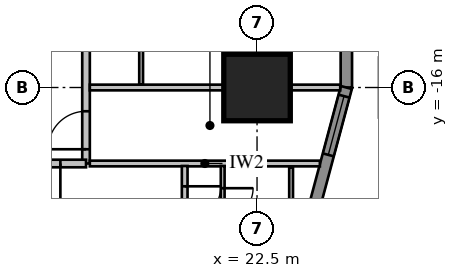
"""IFC4 building model, lengths in metres.
Left out: names, types, materials, properties, quantities, classifications, styles, units other than length and angle.
Written with IfcOpenShell. Run it as: python <this file> out.ifc"""

import sys

from ifc_helpers import new_model, si_unit, direction, frame, frame_2d, origin, origin_2d, place, context, subcontext, project, spatial, rectangle, extrude, element, fill, save


model = new_model("IFC4")
c1 = context("Model", 3, precision=1e-05, world=origin(), true_north=direction((0.0, 1.0)))
c2 = subcontext(c1, "Body", "Model", "MODEL_VIEW")
j1 = project(units=[si_unit("LENGTHUNIT", "METRE"), si_unit("PLANEANGLEUNIT", "RADIAN")], contexts=[c1])
p1 = place(None, origin())
s1 = spatial("IfcSite", under=j1, at=p1, CompositionType="ELEMENT")
p2 = place(p1, origin())
s2 = spatial("IfcBuilding", under=s1, at=p2, CompositionType="ELEMENT")
p3 = place(p2, frame((0.0, 0.0, 27.55)))
s3 = spatial("IfcBuildingStorey", under=s2, at=p3, CompositionType="ELEMENT", Elevation=27.55)
p4 = place(p3, frame((22.5, -16.0, 0.0), z_axis=(0.0, 0.0, 1.0), x_axis=(1.0, 0.0, 0.0)))
e1 = element("IfcColumn", 1, at=p4, inside=s3, PredefinedType="COLUMN", context=c2, shape_type="SweptSolid", body=[
    extrude(rectangle(XDim=1.75, YDim=1.75, at=origin_2d()), origin(), (0.0, 0.0, 1.0), 3.85),
])
p5 = place(p3, frame((24.85, -16.0, 0.0), z_axis=(0.0, 0.0, 1.0), x_axis=(0.0, 1.0, 0.0)))
e2 = element("IfcWall", 2, at=p5, inside=s3, PredefinedType="SOLIDWALL", context=c2, shape_type="SweptSolid", body=[
    extrude(rectangle(XDim=32.0, YDim=0.3, at=frame_2d((16.0, 0.0))), origin(), (0.0, 0.0, 1.0), 3.65),
])
p6 = place(p5, frame((1.2, 0.0, 0.75)))
e3 = element("IfcOpeningElement", 3, at=p6, cuts=e2, PredefinedType="OPENING", context=c2, shape_type="SweptSolid", body=[
    extrude(rectangle(XDim=1.6, YDim=1.8, at=frame_2d((0.8, 0.9))), frame((0.0, 0.17, 0.0), z_axis=(0.0, -1.0, 0.0), x_axis=(1.0, 0.0, 0.0)), (0.0, 0.0, 1.0), 0.34),
])
p7 = place(p5, frame((5.2, 0.0, 0.75)))
e4 = element("IfcOpeningElement", 4, at=p7, cuts=e2, PredefinedType="OPENING", context=c2, shape_type="SweptSolid", body=[
    extrude(rectangle(XDim=1.6, YDim=1.8, at=frame_2d((0.8, 0.9))), frame((0.0, 0.17, 0.0), z_axis=(0.0, -1.0, 0.0), x_axis=(1.0, 0.0, 0.0)), (0.0, 0.0, 1.0), 0.34),
])
p8 = place(p5, frame((17.2, 0.0, 0.75)))
e5 = element("IfcOpeningElement", 5, at=p8, cuts=e2, PredefinedType="OPENING", context=c2, shape_type="SweptSolid", body=[
    extrude(rectangle(XDim=1.6, YDim=1.8, at=frame_2d((0.8, 0.9))), frame((0.0, 0.17, 0.0), z_axis=(0.0, -1.0, 0.0), x_axis=(1.0, 0.0, 0.0)), (0.0, 0.0, 1.0), 0.34),
])
p9 = place(p5, frame((21.2, 0.0, 0.75)))
e6 = element("IfcOpeningElement", 6, at=p9, cuts=e2, PredefinedType="OPENING", context=c2, shape_type="SweptSolid", body=[
    extrude(rectangle(XDim=1.6, YDim=1.8, at=frame_2d((0.8, 0.9))), frame((0.0, 0.17, 0.0), z_axis=(0.0, -1.0, 0.0), x_axis=(1.0, 0.0, 0.0)), (0.0, 0.0, 1.0), 0.34),
])
p10 = place(p5, frame((25.2, 0.0, 0.75)))
e7 = element("IfcOpeningElement", 7, at=p10, cuts=e2, PredefinedType="OPENING", context=c2, shape_type="SweptSolid", body=[
    extrude(rectangle(XDim=1.6, YDim=1.8, at=frame_2d((0.8, 0.9))), frame((0.0, 0.17, 0.0), z_axis=(0.0, -1.0, 0.0), x_axis=(1.0, 0.0, 0.0)), (0.0, 0.0, 1.0), 0.34),
])
p11 = place(p5, frame((29.2, 0.0, 0.75)))
e8 = element("IfcOpeningElement", 8, at=p11, cuts=e2, PredefinedType="OPENING", context=c2, shape_type="SweptSolid", body=[
    extrude(rectangle(XDim=1.6, YDim=1.8, at=frame_2d((0.8, 0.9))), frame((0.0, 0.17, 0.0), z_axis=(0.0, -1.0, 0.0), x_axis=(1.0, 0.0, 0.0)), (0.0, 0.0, 1.0), 0.34),
])
p12 = place(p5, frame((8.8, 0.0, 0.75)))
e9 = element("IfcOpeningElement", 9, at=p12, cuts=e2, PredefinedType="OPENING", context=c2, shape_type="SweptSolid", body=[
    extrude(rectangle(XDim=2.4, YDim=1.8, at=frame_2d((1.2, 0.9))), frame((0.0, 0.17, 0.0), z_axis=(0.0, -1.0, 0.0), x_axis=(1.0, 0.0, 0.0)), (0.0, 0.0, 1.0), 0.34),
])
p13 = place(p5, frame((13.812, 0.0, 0.0)))
e10 = element("IfcOpeningElement", 10, at=p13, cuts=e2, PredefinedType="OPENING", context=c2, shape_type="SweptSolid", body=[
    extrude(rectangle(XDim=1.0, YDim=2.4, at=frame_2d((0.5, 1.2))), frame((0.0, 0.17, 0.0), z_axis=(0.0, -1.0, 0.0), x_axis=(1.0, 0.0, 0.0)), (0.0, 0.0, 1.0), 0.34),
])
p14 = place(p3, frame((23.664, -20.425, 0.0), z_axis=(0.0, 0.0, 1.0), x_axis=(0.258839972501, 0.965920218567, 0.0)))
e11 = element("IfcWall", 11, at=p14, inside=s3, PredefinedType="SOLIDWALL", context=c2, shape_type="SweptSolid", body=[
    extrude(rectangle(XDim=4.581, YDim=0.3, at=frame_2d((2.291, 0.0))), origin(), (0.0, 0.0, 1.0), 3.65),
])
p15 = place(p14, frame((2.746, 0.0, 0.75)))
e12 = element("IfcOpeningElement", 12, at=p15, cuts=e11, PredefinedType="OPENING", context=c2, shape_type="SweptSolid", body=[
    extrude(rectangle(XDim=1.6, YDim=1.8, at=frame_2d((0.8, 0.9))), frame((0.0, 0.17, 0.0), z_axis=(0.0, -1.0, 0.0), x_axis=(1.0, 0.0, 0.0)), (0.0, 0.0, 1.0), 0.34),
])
p16 = place(p3, frame((18.0, -18.0, 0.0), z_axis=(0.0, 0.0, 1.0), x_axis=(0.0, 1.0, 0.0)))
e13 = element("IfcWall", 13, at=p16, inside=s3, PredefinedType="PARTITIONING", context=c2, shape_type="SweptSolid", body=[
    extrude(rectangle(XDim=36.0, YDim=0.2, at=frame_2d((18.0, 0.0))), origin(), (0.0, 0.0, 1.0), 3.65),
])
p17 = place(p16, frame((10.4, 0.0, 0.0)))
e14 = element("IfcOpeningElement", 14, at=p17, cuts=e13, PredefinedType="OPENING", context=c2, shape_type="SweptSolid", body=[
    extrude(rectangle(XDim=1.0, YDim=2.1, at=frame_2d((0.5, 1.05))), frame((0.0, 0.12, 0.0), z_axis=(0.0, -1.0, 0.0), x_axis=(1.0, 0.0, 0.0)), (0.0, 0.0, 1.0), 0.24),
])
p18 = place(p16, frame((0.375, 0.0, 0.0)))
e15 = element("IfcOpeningElement", 15, at=p18, cuts=e13, PredefinedType="OPENING", context=c2, shape_type="SweptSolid", body=[
    extrude(rectangle(XDim=1.0, YDim=2.1, at=frame_2d((0.5, 1.05))), frame((0.0, 0.12, 0.0), z_axis=(0.0, -1.0, 0.0), x_axis=(1.0, 0.0, 0.0)), (0.0, 0.0, 1.0), 0.24),
])
p19 = place(p16, frame((34.375, 0.0, 0.0)))
e16 = element("IfcOpeningElement", 16, at=p19, cuts=e13, PredefinedType="OPENING", context=c2, shape_type="SweptSolid", body=[
    extrude(rectangle(XDim=0.95, YDim=2.1, at=frame_2d((0.475, 1.05))), frame((0.0, 0.12, 0.0), z_axis=(0.0, -1.0, 0.0), x_axis=(1.0, 0.0, 0.0)), (0.0, 0.0, 1.0), 0.24),
])
p20 = place(p3, frame((19.45, -15.925, 0.0), z_axis=(0.0, 0.0, 1.0), x_axis=(0.0, 1.0, 0.0)))
e17 = element("IfcWall", 17, at=p20, inside=s3, PredefinedType="PARTITIONING", context=c2, shape_type="SweptSolid", body=[
    extrude(rectangle(XDim=31.85, YDim=0.1, at=frame_2d((15.925, 0.0))), origin(), (0.0, 0.0, 1.0), 3.65),
])
p21 = place(p20, frame((10.125, 0.0, 0.0)))
e18 = element("IfcOpeningElement", 18, at=p21, cuts=e17, PredefinedType="OPENING", context=c2, shape_type="SweptSolid", body=[
    extrude(rectangle(XDim=1.0, YDim=2.1, at=frame_2d((0.5, 1.05))), frame((0.0, 0.07, 0.0), z_axis=(0.0, -1.0, 0.0), x_axis=(1.0, 0.0, 0.0)), (0.0, 0.0, 1.0), 0.14),
])
p22 = place(p20, frame((8.3, 0.0, 0.0)))
e19 = element("IfcOpeningElement", 19, at=p22, cuts=e17, PredefinedType="OPENING", context=c2, shape_type="SweptSolid", body=[
    extrude(rectangle(XDim=0.8, YDim=2.1, at=frame_2d((0.4, 1.05))), frame((0.0, 0.07, 0.0), z_axis=(0.0, -1.0, 0.0), x_axis=(1.0, 0.0, 0.0)), (0.0, 0.0, 1.0), 0.14),
])
p23 = place(p20, frame((1.725, 0.0, 0.0)))
e20 = element("IfcOpeningElement", 20, at=p23, cuts=e17, PredefinedType="OPENING", context=c2, shape_type="SweptSolid", body=[
    extrude(rectangle(XDim=0.95, YDim=2.1, at=frame_2d((0.475, 1.05))), frame((0.0, 0.07, 0.0), z_axis=(0.0, -1.0, 0.0), x_axis=(1.0, 0.0, 0.0)), (0.0, 0.0, 1.0), 0.14),
])
p24 = place(p20, frame((5.725, 0.0, 0.0)))
e21 = element("IfcOpeningElement", 21, at=p24, cuts=e17, PredefinedType="OPENING", context=c2, shape_type="SweptSolid", body=[
    extrude(rectangle(XDim=0.95, YDim=2.1, at=frame_2d((0.475, 1.05))), frame((0.0, 0.07, 0.0), z_axis=(0.0, -1.0, 0.0), x_axis=(1.0, 0.0, 0.0)), (0.0, 0.0, 1.0), 0.14),
])
p25 = place(p20, frame((17.725, 0.0, 0.0)))
e22 = element("IfcOpeningElement", 22, at=p25, cuts=e17, PredefinedType="OPENING", context=c2, shape_type="SweptSolid", body=[
    extrude(rectangle(XDim=0.95, YDim=2.1, at=frame_2d((0.475, 1.05))), frame((0.0, 0.07, 0.0), z_axis=(0.0, -1.0, 0.0), x_axis=(1.0, 0.0, 0.0)), (0.0, 0.0, 1.0), 0.14),
])
p26 = place(p20, frame((21.725, 0.0, 0.0)))
e23 = element("IfcOpeningElement", 23, at=p26, cuts=e17, PredefinedType="OPENING", context=c2, shape_type="SweptSolid", body=[
    extrude(rectangle(XDim=0.95, YDim=2.1, at=frame_2d((0.475, 1.05))), frame((0.0, 0.07, 0.0), z_axis=(0.0, -1.0, 0.0), x_axis=(1.0, 0.0, 0.0)), (0.0, 0.0, 1.0), 0.14),
])
p27 = place(p20, frame((25.725, 0.0, 0.0)))
e24 = element("IfcOpeningElement", 24, at=p27, cuts=e17, PredefinedType="OPENING", context=c2, shape_type="SweptSolid", body=[
    extrude(rectangle(XDim=0.95, YDim=2.1, at=frame_2d((0.475, 1.05))), frame((0.0, 0.07, 0.0), z_axis=(0.0, -1.0, 0.0), x_axis=(1.0, 0.0, 0.0)), (0.0, 0.0, 1.0), 0.14),
])
p28 = place(p20, frame((29.725, 0.0, 0.0)))
e25 = element("IfcOpeningElement", 25, at=p28, cuts=e17, PredefinedType="OPENING", context=c2, shape_type="SweptSolid", body=[
    extrude(rectangle(XDim=0.95, YDim=2.1, at=frame_2d((0.475, 1.05))), frame((0.0, 0.07, 0.0), z_axis=(0.0, -1.0, 0.0), x_axis=(1.0, 0.0, 0.0)), (0.0, 0.0, 1.0), 0.14),
])
p29 = place(p3, frame((18.1, -18.0, 0.0), z_axis=(0.0, 0.0, 1.0), x_axis=(1.0, 0.0, 0.0)))
e26 = element("IfcWall", 26, at=p29, inside=s3, PredefinedType="PARTITIONING", context=c2, shape_type="SweptSolid", body=[
    extrude(rectangle(XDim=6.053, YDim=0.15, at=frame_2d((3.027, 0.0))), origin(), (0.0, 0.0, 1.0), 3.65),
])
p30 = place(p3, frame((18.1, -16.0, 0.0), z_axis=(0.0, 0.0, 1.0), x_axis=(1.0, 0.0, 0.0)))
e27 = element("IfcWall", 27, at=p30, inside=s3, PredefinedType="PARTITIONING", context=c2, shape_type="SweptSolid", body=[
    extrude(rectangle(XDim=6.589, YDim=0.15, at=frame_2d((3.295, 0.0))), origin(), (0.0, 0.0, 1.0), 3.65),
])
p31 = place(p3, frame((22.15, -15.925, 0.0), z_axis=(0.0, 0.0, 1.0), x_axis=(0.0, 1.0, 0.0)))
e28 = element("IfcWall", 28, at=p31, inside=s3, PredefinedType="PARTITIONING", context=c2, shape_type="SweptSolid", body=[
    extrude(rectangle(XDim=1.45, YDim=0.1, at=frame_2d((0.725, 0.0))), origin(), (0.0, 0.0, 1.0), 3.65),
])
p32 = place(p3, frame((-18.0, -18.0, 0.0), z_axis=(0.0, 0.0, 1.0), x_axis=(1.0, 0.0, 0.0)))
e29 = element("IfcWall", 29, at=p32, inside=s3, PredefinedType="PARTITIONING", context=c2, shape_type="SweptSolid", body=[
    extrude(rectangle(XDim=36.0, YDim=0.2, at=frame_2d((18.0, 0.0))), origin(), (0.0, 0.0, 1.0), 3.65),
])
p33 = place(p32, frame((0.375, 0.0, 0.0)))
e30 = element("IfcOpeningElement", 30, at=p33, cuts=e29, PredefinedType="OPENING", context=c2, shape_type="SweptSolid", body=[
    extrude(rectangle(XDim=1.0, YDim=2.1, at=frame_2d((0.5, 1.05))), frame((0.0, 0.12, 0.0), z_axis=(0.0, -1.0, 0.0), x_axis=(1.0, 0.0, 0.0)), (0.0, 0.0, 1.0), 0.24),
])
p34 = place(p32, frame((2.45, 0.0, 0.0)))
e31 = element("IfcOpeningElement", 31, at=p34, cuts=e29, PredefinedType="OPENING", context=c2, shape_type="SweptSolid", body=[
    extrude(rectangle(XDim=0.8, YDim=2.1, at=frame_2d((0.4, 1.05))), frame((0.0, 0.12, 0.0), z_axis=(0.0, -1.0, 0.0), x_axis=(1.0, 0.0, 0.0)), (0.0, 0.0, 1.0), 0.24),
])
p35 = place(p32, frame((4.05, 0.0, 0.0)))
e32 = element("IfcOpeningElement", 32, at=p35, cuts=e29, PredefinedType="OPENING", context=c2, shape_type="SweptSolid", body=[
    extrude(rectangle(XDim=1.0, YDim=2.1, at=frame_2d((0.5, 1.05))), frame((0.0, 0.12, 0.0), z_axis=(0.0, -1.0, 0.0), x_axis=(1.0, 0.0, 0.0)), (0.0, 0.0, 1.0), 0.24),
])
p36 = place(p32, frame((6.45, 0.0, 0.0)))
e33 = element("IfcOpeningElement", 33, at=p36, cuts=e29, PredefinedType="OPENING", context=c2, shape_type="SweptSolid", body=[
    extrude(rectangle(XDim=0.9, YDim=2.1, at=frame_2d((0.45, 1.05))), frame((0.0, 0.12, 0.0), z_axis=(0.0, -1.0, 0.0), x_axis=(1.0, 0.0, 0.0)), (0.0, 0.0, 1.0), 0.24),
])
p37 = place(p32, frame((8.15, 0.0, 0.0)))
e34 = element("IfcOpeningElement", 34, at=p37, cuts=e29, PredefinedType="OPENING", context=c2, shape_type="SweptSolid", body=[
    extrude(rectangle(XDim=1.0, YDim=2.1, at=frame_2d((0.5, 1.05))), frame((0.0, 0.12, 0.0), z_axis=(0.0, -1.0, 0.0), x_axis=(1.0, 0.0, 0.0)), (0.0, 0.0, 1.0), 0.24),
])
p38 = place(p32, frame((19.8, 0.0, 0.0)))
e35 = element("IfcOpeningElement", 35, at=p38, cuts=e29, PredefinedType="OPENING", context=c2, shape_type="SweptSolid", body=[
    extrude(rectangle(XDim=0.95, YDim=2.1, at=frame_2d((0.475, 1.05))), frame((0.0, 0.12, 0.0), z_axis=(0.0, -1.0, 0.0), x_axis=(1.0, 0.0, 0.0)), (0.0, 0.0, 1.0), 0.24),
])
p39 = place(p32, frame((23.8, 0.0, 0.0)))
e36 = element("IfcOpeningElement", 36, at=p39, cuts=e29, PredefinedType="OPENING", context=c2, shape_type="SweptSolid", body=[
    extrude(rectangle(XDim=0.95, YDim=2.1, at=frame_2d((0.475, 1.05))), frame((0.0, 0.12, 0.0), z_axis=(0.0, -1.0, 0.0), x_axis=(1.0, 0.0, 0.0)), (0.0, 0.0, 1.0), 0.24),
])
p40 = place(p32, frame((27.8, 0.0, 0.0)))
e37 = element("IfcOpeningElement", 37, at=p40, cuts=e29, PredefinedType="OPENING", context=c2, shape_type="SweptSolid", body=[
    extrude(rectangle(XDim=0.95, YDim=2.1, at=frame_2d((0.475, 1.05))), frame((0.0, 0.12, 0.0), z_axis=(0.0, -1.0, 0.0), x_axis=(1.0, 0.0, 0.0)), (0.0, 0.0, 1.0), 0.24),
])
p41 = place(p32, frame((31.8, 0.0, 0.0)))
e38 = element("IfcOpeningElement", 38, at=p41, cuts=e29, PredefinedType="OPENING", context=c2, shape_type="SweptSolid", body=[
    extrude(rectangle(XDim=0.95, YDim=2.1, at=frame_2d((0.475, 1.05))), frame((0.0, 0.12, 0.0), z_axis=(0.0, -1.0, 0.0), x_axis=(1.0, 0.0, 0.0)), (0.0, 0.0, 1.0), 0.24),
])
p42 = place(p32, frame((34.375, 0.0, 0.0)))
e39 = element("IfcOpeningElement", 39, at=p42, cuts=e29, PredefinedType="OPENING", context=c2, shape_type="SweptSolid", body=[
    extrude(rectangle(XDim=0.95, YDim=2.1, at=frame_2d((0.475, 1.05))), frame((0.0, 0.12, 0.0), z_axis=(0.0, -1.0, 0.0), x_axis=(1.0, 0.0, 0.0)), (0.0, 0.0, 1.0), 0.24),
])
p43 = place(p32, frame((11.2, 0.0, 0.0)))
e40 = element("IfcOpeningElement", 40, at=p43, cuts=e29, PredefinedType="OPENING", context=c2, shape_type="SweptSolid", body=[
    extrude(rectangle(XDim=1.0, YDim=2.1, at=frame_2d((0.5, 1.05))), frame((0.0, 0.12, 0.0), z_axis=(0.0, -1.0, 0.0), x_axis=(1.0, 0.0, 0.0)), (0.0, 0.0, 1.0), 0.24),
])
p44 = place(p3, frame((21.596, -18.065, 0.0), z_axis=(0.0, 0.0, 1.0), x_axis=(0.0, -1.0, 0.0)))
e41 = element("IfcWall", 41, at=p44, inside=s3, PredefinedType="PARTITIONING", context=c2, shape_type="SweptSolid", body=[
    extrude(rectangle(XDim=2.335, YDim=0.1, at=frame_2d((1.167, 0.0))), origin(), (0.0, 0.0, 1.0), 3.65),
])
p45 = place(p44, frame((0.585, 0.0, 0.0)))
e42 = element("IfcOpeningElement", 42, at=p45, cuts=e41, PredefinedType="OPENING", context=c2, shape_type="SweptSolid", body=[
    extrude(rectangle(XDim=0.8, YDim=2.1, at=frame_2d((0.4, 1.05))), frame((0.0, 0.07, 0.0), z_axis=(0.0, -1.0, 0.0), x_axis=(1.0, 0.0, 0.0)), (0.0, 0.0, 1.0), 0.14),
])
p46 = place(p3, frame((23.396, -18.1, 0.0), z_axis=(0.0, 0.0, 1.0), x_axis=(0.0, -1.0, 0.0)))
e43 = element("IfcWall", 43, at=p46, inside=s3, PredefinedType="PARTITIONING", context=c2, shape_type="SweptSolid", body=[
    extrude(rectangle(XDim=2.3, YDim=0.1, at=frame_2d((1.15, 0.0))), origin(), (0.0, 0.0, 1.0), 3.65),
])
p47 = place(p3, frame((20.596, -18.065, 0.0), z_axis=(0.0, 0.0, 1.0), x_axis=(0.0, -1.0, 0.0)))
e44 = element("IfcWall", 44, at=p47, inside=s3, PredefinedType="PARTITIONING", context=c2, shape_type="SweptSolid", body=[
    extrude(rectangle(XDim=5.209, YDim=0.15, at=frame_2d((2.604, 0.0))), origin(), (0.0, 0.0, 1.0), 3.65),
])
p48 = place(p47, frame((0.535, 0.0, 0.0)))
e45 = element("IfcOpeningElement", 45, at=p48, cuts=e44, PredefinedType="OPENING", context=c2, shape_type="SweptSolid", body=[
    extrude(rectangle(XDim=0.95, YDim=2.1, at=frame_2d((0.475, 1.05))), frame((0.0, 0.095, 0.0), z_axis=(0.0, -1.0, 0.0), x_axis=(1.0, 0.0, 0.0)), (0.0, 0.0, 1.0), 0.19),
])
p49 = place(p15, origin())
e46 = element("IfcWindow", 46, at=p49, inside=s3, PartitioningType="SINGLE_PANEL", PredefinedType="WINDOW", context=c2, shape_type="SweptSolid", body=[
    extrude(rectangle(XDim=1.6, YDim=1.8, at=frame_2d((0.8, 0.9))), frame((0.0, 0.03, 0.0), z_axis=(0.0, -1.0, 0.0), x_axis=(1.0, 0.0, 0.0)), (0.0, 0.0, 1.0), 0.06),
])
fill(e12, e46)
p50 = place(p18, origin())
e47 = element("IfcDoor", 47, at=p50, inside=s3, OperationType="SINGLE_SWING_LEFT", PredefinedType="DOOR", context=c2, shape_type="SweptSolid", body=[
    extrude(rectangle(XDim=1.0, YDim=2.1, at=frame_2d((0.5, 1.05))), frame((0.0, 0.025, 0.0), z_axis=(0.0, -1.0, 0.0), x_axis=(1.0, 0.0, 0.0)), (0.0, 0.0, 1.0), 0.05),
])
fill(e15, e47)
p51 = place(p42, origin())
e48 = element("IfcDoor", 48, at=p51, inside=s3, OperationType="SINGLE_SWING_RIGHT", PredefinedType="DOOR", context=c2, shape_type="SweptSolid", body=[
    extrude(rectangle(XDim=0.95, YDim=2.1, at=frame_2d((0.475, 1.05))), frame((0.0, 0.025, 0.0), z_axis=(0.0, -1.0, 0.0), x_axis=(1.0, 0.0, 0.0)), (0.0, 0.0, 1.0), 0.05),
])
fill(e39, e48)
p52 = place(p45, origin())
e49 = element("IfcDoor", 49, at=p52, inside=s3, OperationType="SINGLE_SWING_LEFT", PredefinedType="DOOR", context=c2, shape_type="SweptSolid", body=[
    extrude(rectangle(XDim=0.8, YDim=2.1, at=frame_2d((0.4, 1.05))), frame((0.0, 0.025, 0.0), z_axis=(0.0, -1.0, 0.0), x_axis=(1.0, 0.0, 0.0)), (0.0, 0.0, 1.0), 0.05),
])
fill(e42, e49)
p53 = place(p48, origin())
e50 = element("IfcDoor", 50, at=p53, inside=s3, OperationType="SINGLE_SWING_LEFT", PredefinedType="DOOR", context=c2, shape_type="SweptSolid", body=[
    extrude(rectangle(XDim=0.95, YDim=2.1, at=frame_2d((0.475, 1.05))), frame((0.0, 0.025, 0.0), z_axis=(0.0, -1.0, 0.0), x_axis=(1.0, 0.0, 0.0)), (0.0, 0.0, 1.0), 0.05),
])
fill(e45, e50)
save(model, sys.argv[1])
